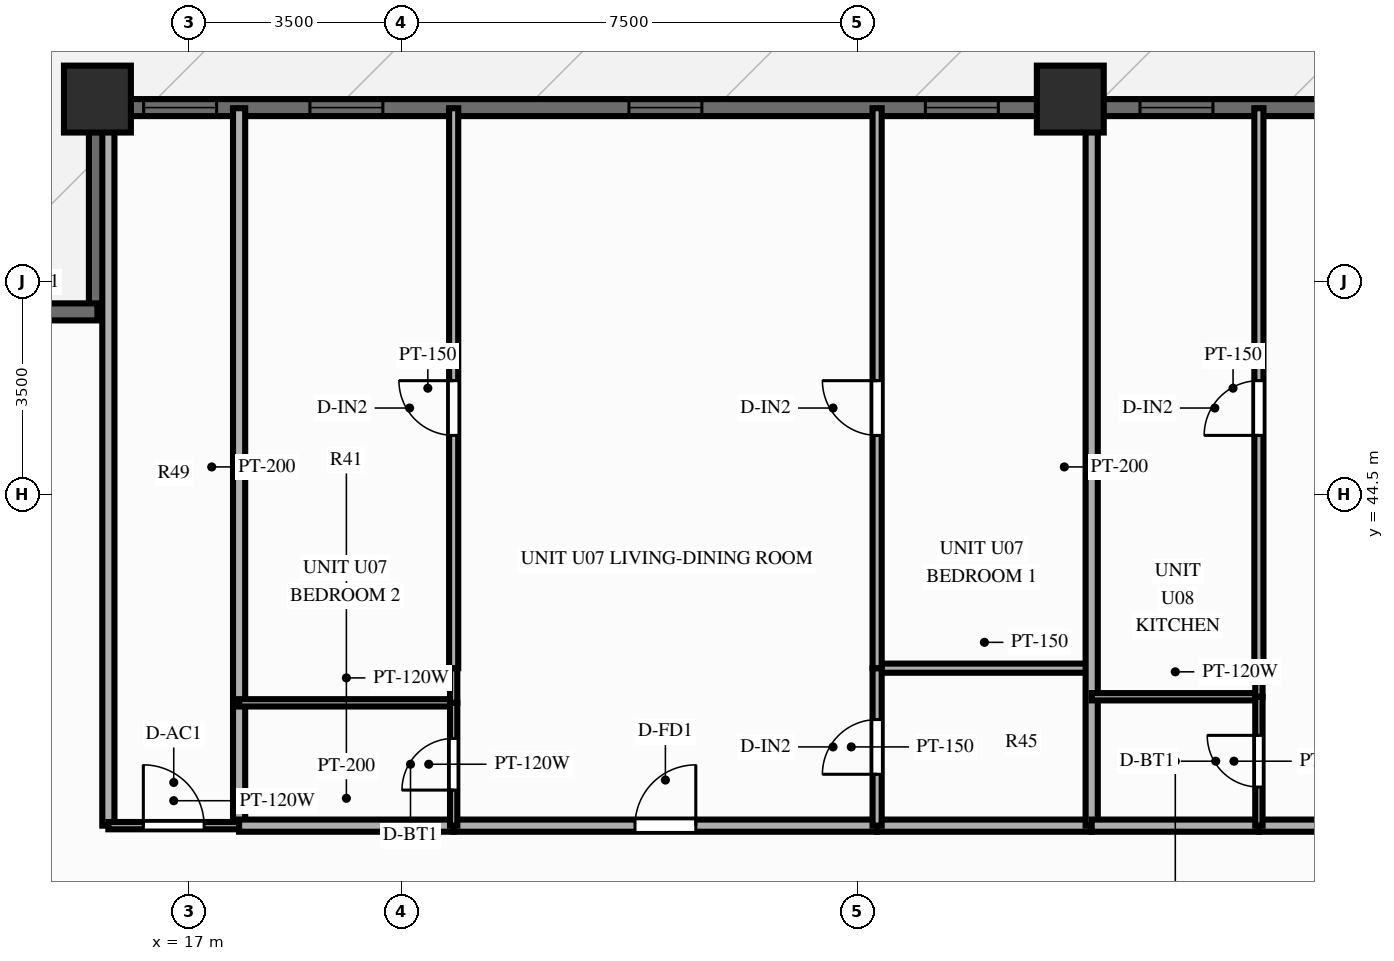
"""IFC4 building model, lengths in metres.
Left out: names, types, materials, properties, quantities, classifications, styles, units other than length and angle.
Written with IfcOpenShell. Run it as: python <this file> out.ifc"""

import sys

from ifc_helpers import new_model, si_unit, direction, frame, frame_2d, origin, origin_2d, place, context, subcontext, project, spatial, rectangle, extrude, source, transform, mapped, element, fill, save


model = new_model("IFC4")
c1 = context("Model", 3, precision=1e-05, world=origin(), true_north=direction((0.0, 1.0)))
c2 = subcontext(c1, "Body", "Model", "MODEL_VIEW")
j1 = project(units=[si_unit("LENGTHUNIT", "METRE"), si_unit("PLANEANGLEUNIT", "RADIAN")], contexts=[c1])
p1 = place(None, origin())
s1 = spatial("IfcSite", under=j1, at=p1, CompositionType="ELEMENT")
p2 = place(p1, origin())
s2 = spatial("IfcBuilding", under=s1, at=p2, CompositionType="ELEMENT")
p3 = place(p2, frame((0.0, 0.0, 19.4)))
s3 = spatial("IfcBuildingStorey", under=s2, at=p3, CompositionType="ELEMENT", Elevation=19.4)
m1 = source(origin(), c2, "Body", "SweptSolid", [
    extrude(rectangle(XDim=1.1, YDim=1.1, at=origin_2d()), origin(), (0.0, 0.0, 1.0), 3.0),
])
for number, where, z_axis, x_axis in (
    (1, (31.5, 51.0, 0.0), (0.0, 0.0, 1.0), (1.0, 0.0, 0.0)),
    (2, (15.5, 51.0, 0.0), (0.0, 0.0, 1.0), (1.0, 0.0, 0.0)),
):
    element("IfcColumn", number, at=place(p3, frame(where, z_axis=z_axis, x_axis=x_axis)), inside=s3, PredefinedType="COLUMN", context=c2, shape_type="MappedRepresentation", body=[
        mapped(m1, transform((0.0, 0.0, 0.0), scale=1.0)),
    ])
p4 = place(p3, frame((15.5, 50.86, 0.0), z_axis=(0.0, 0.0, 1.0), x_axis=(1.0, 0.0, 0.0)))
e3 = element("IfcWall", 3, at=p4, inside=s3, PredefinedType="SOLIDWALL", context=c2, shape_type="SweptSolid", body=[
    extrude(rectangle(XDim=45.0, YDim=0.28, at=frame_2d((22.5, 0.0))), origin(), (0.0, 0.0, 1.0), 2.28),
])
p5 = place(p4, frame((0.76, 0.0, 0.25)))
e4 = element("IfcOpeningElement", 4, at=p5, cuts=e3, PredefinedType="OPENING", context=c2, shape_type="SweptSolid", body=[
    extrude(rectangle(XDim=1.2, YDim=1.5, at=frame_2d((0.6, 0.75))), frame((0.0, 0.152, 0.0), z_axis=(0.0, -1.0, 0.0), x_axis=(1.0, 0.0, 0.0)), (0.0, 0.0, 1.0), 0.304),
])
p6 = place(p4, frame((3.494, 0.0, 0.25)))
e5 = element("IfcOpeningElement", 5, at=p6, cuts=e3, PredefinedType="OPENING", context=c2, shape_type="SweptSolid", body=[
    extrude(rectangle(XDim=1.2, YDim=1.5, at=frame_2d((0.6, 0.75))), frame((0.0, 0.152, 0.0), z_axis=(0.0, -1.0, 0.0), x_axis=(1.0, 0.0, 0.0)), (0.0, 0.0, 1.0), 0.304),
])
p7 = place(p4, frame((8.741, 0.0, 0.25)))
e6 = element("IfcOpeningElement", 6, at=p7, cuts=e3, PredefinedType="OPENING", context=c2, shape_type="SweptSolid", body=[
    extrude(rectangle(XDim=1.2, YDim=1.5, at=frame_2d((0.6, 0.75))), frame((0.0, 0.152, 0.0), z_axis=(0.0, -1.0, 0.0), x_axis=(1.0, 0.0, 0.0)), (0.0, 0.0, 1.0), 0.304),
])
p8 = place(p4, frame((13.616, 0.0, 0.25)))
e7 = element("IfcOpeningElement", 7, at=p8, cuts=e3, PredefinedType="OPENING", context=c2, shape_type="SweptSolid", body=[
    extrude(rectangle(XDim=1.2, YDim=1.5, at=frame_2d((0.6, 0.75))), frame((0.0, 0.152, 0.0), z_axis=(0.0, -1.0, 0.0), x_axis=(1.0, 0.0, 0.0)), (0.0, 0.0, 1.0), 0.304),
])
p9 = place(p4, frame((17.146, 0.0, 0.25)))
e8 = element("IfcOpeningElement", 8, at=p9, cuts=e3, PredefinedType="OPENING", context=c2, shape_type="SweptSolid", body=[
    extrude(rectangle(XDim=1.2, YDim=1.5, at=frame_2d((0.6, 0.75))), frame((0.0, 0.152, 0.0), z_axis=(0.0, -1.0, 0.0), x_axis=(1.0, 0.0, 0.0)), (0.0, 0.0, 1.0), 0.304),
])
p10 = place(p4, frame((22.423, 0.0, 0.0)))
e9 = element("IfcOpeningElement", 9, at=p10, cuts=e3, PredefinedType="OPENING", context=c2, shape_type="SweptSolid", body=[
    extrude(rectangle(XDim=1.1, YDim=2.15, at=frame_2d((0.55, 1.075))), frame((0.0, 0.152, 0.0), z_axis=(0.0, -1.0, 0.0), x_axis=(1.0, 0.0, 0.0)), (0.0, 0.0, 1.0), 0.304),
])
p11 = place(p4, frame((27.252, 0.0, 0.25)))
e10 = element("IfcOpeningElement", 10, at=p11, cuts=e3, PredefinedType="OPENING", context=c2, shape_type="SweptSolid", body=[
    extrude(rectangle(XDim=0.95, YDim=1.5, at=frame_2d((0.475, 0.75))), frame((0.0, 0.152, 0.0), z_axis=(0.0, -1.0, 0.0), x_axis=(1.0, 0.0, 0.0)), (0.0, 0.0, 1.0), 0.304),
])
p12 = place(p4, frame((30.873, 0.0, 0.25)))
e11 = element("IfcOpeningElement", 11, at=p12, cuts=e3, PredefinedType="OPENING", context=c2, shape_type="SweptSolid", body=[
    extrude(rectangle(XDim=1.2, YDim=1.5, at=frame_2d((0.6, 0.75))), frame((0.0, 0.152, 0.0), z_axis=(0.0, -1.0, 0.0), x_axis=(1.0, 0.0, 0.0)), (0.0, 0.0, 1.0), 0.304),
])
p13 = place(p4, frame((33.113, 0.0, 0.25)))
e12 = element("IfcOpeningElement", 12, at=p13, cuts=e3, PredefinedType="OPENING", context=c2, shape_type="SweptSolid", body=[
    extrude(rectangle(XDim=1.2, YDim=1.5, at=frame_2d((0.6, 0.75))), frame((0.0, 0.152, 0.0), z_axis=(0.0, -1.0, 0.0), x_axis=(1.0, 0.0, 0.0)), (0.0, 0.0, 1.0), 0.304),
])
p14 = place(p4, frame((35.624, 0.0, 0.25)))
e13 = element("IfcOpeningElement", 13, at=p14, cuts=e3, PredefinedType="OPENING", context=c2, shape_type="SweptSolid", body=[
    extrude(rectangle(XDim=1.2, YDim=1.5, at=frame_2d((0.6, 0.75))), frame((0.0, 0.152, 0.0), z_axis=(0.0, -1.0, 0.0), x_axis=(1.0, 0.0, 0.0)), (0.0, 0.0, 1.0), 0.304),
])
p15 = place(p4, frame((38.097, 0.0, 0.25)))
e14 = element("IfcOpeningElement", 14, at=p15, cuts=e3, PredefinedType="OPENING", context=c2, shape_type="SweptSolid", body=[
    extrude(rectangle(XDim=1.2, YDim=1.5, at=frame_2d((0.6, 0.75))), frame((0.0, 0.152, 0.0), z_axis=(0.0, -1.0, 0.0), x_axis=(1.0, 0.0, 0.0)), (0.0, 0.0, 1.0), 0.304),
])
p16 = place(p4, frame((40.336, 0.0, 0.25)))
e15 = element("IfcOpeningElement", 15, at=p16, cuts=e3, PredefinedType="OPENING", context=c2, shape_type="SweptSolid", body=[
    extrude(rectangle(XDim=1.2, YDim=1.5, at=frame_2d((0.6, 0.75))), frame((0.0, 0.152, 0.0), z_axis=(0.0, -1.0, 0.0), x_axis=(1.0, 0.0, 0.0)), (0.0, 0.0, 1.0), 0.304),
])
p17 = place(p4, frame((42.743, 0.0, 0.25)))
e16 = element("IfcOpeningElement", 16, at=p17, cuts=e3, PredefinedType="OPENING", context=c2, shape_type="SweptSolid", body=[
    extrude(rectangle(XDim=1.2, YDim=1.5, at=frame_2d((0.6, 0.75))), frame((0.0, 0.152, 0.0), z_axis=(0.0, -1.0, 0.0), x_axis=(1.0, 0.0, 0.0)), (0.0, 0.0, 1.0), 0.304),
])
for number, where, z_axis, x_axis in (
    (17, (15.5, 47.5, 0.0), (0.0, 0.0, 1.0), (0.0, 1.0, 0.0)),
    (18, (12.08, 47.5, 0.0), (0.0, 0.0, 1.0), (1.0, 0.0, 0.0)),
):
    element("IfcWall", number, at=place(p3, frame(where, z_axis=z_axis, x_axis=x_axis)), inside=s3, PredefinedType="SOLIDWALL", context=c2, shape_type="SweptSolid", body=[
        extrude(rectangle(XDim=3.42, YDim=0.28, at=frame_2d((1.71, 0.0))), origin(), (0.0, 0.0, 1.0), 2.28),
    ])
for number, where, z_axis, x_axis in (
    (19, (15.68, 39.05, 0.0), (0.0, 0.0, 1.0), (0.0, 1.0, 0.0)),
    (20, (17.83, 39.05, 0.0), (0.0, 0.0, 1.0), (0.0, 1.0, 0.0)),
):
    element("IfcWall", number, at=place(p3, frame(where, z_axis=z_axis, x_axis=x_axis)), inside=s3, PredefinedType="PARTITIONING", context=c2, shape_type="SweptSolid", body=[
        extrude(rectangle(XDim=11.8, YDim=0.2, at=frame_2d((5.9, 0.0))), origin(), (0.0, 0.0, 1.0), 2.79),
    ])
p18 = place(p3, frame((15.68, 39.05, 0.0), z_axis=(0.0, 0.0, 1.0), x_axis=(1.0, 0.0, 0.0)))
e21 = element("IfcWall", 21, at=p18, inside=s3, PredefinedType="PARTITIONING", context=c2, shape_type="SweptSolid", body=[
    extrude(rectangle(XDim=2.15, YDim=0.12, at=frame_2d((1.075, 0.0))), origin(), (0.0, 0.0, 1.0), 2.79),
])
p19 = place(p18, frame((0.575, 0.0, 0.0)))
e22 = element("IfcOpeningElement", 22, at=p19, cuts=e21, PredefinedType="OPENING", context=c2, shape_type="SweptSolid", body=[
    extrude(rectangle(XDim=1.0, YDim=2.1, at=frame_2d((0.5, 1.05))), frame((0.0, 0.072, 0.0), z_axis=(0.0, -1.0, 0.0), x_axis=(1.0, 0.0, 0.0)), (0.0, 0.0, 1.0), 0.144),
])
p20 = place(p3, frame((17.83, 39.05, 0.0), z_axis=(0.0, 0.0, 1.0), x_axis=(1.0, 0.0, 0.0)))
e23 = element("IfcWall", 23, at=p20, inside=s3, PredefinedType="PARTITIONING", context=c2, shape_type="SweptSolid", body=[
    extrude(rectangle(XDim=3.529, YDim=0.2, at=frame_2d((1.764, 0.0))), origin(), (0.0, 0.0, 1.0), 2.79),
])
p21 = place(p3, frame((21.359, 39.05, 0.0), z_axis=(0.0, 0.0, 1.0), x_axis=(1.0, 0.0, 0.0)))
e24 = element("IfcWall", 24, at=p21, inside=s3, PredefinedType="PARTITIONING", context=c2, shape_type="SweptSolid", body=[
    extrude(rectangle(XDim=6.964, YDim=0.2, at=frame_2d((3.482, 0.0))), origin(), (0.0, 0.0, 1.0), 2.79),
])
p22 = place(p21, frame((2.982, 0.0, 0.0)))
e25 = element("IfcOpeningElement", 25, at=p22, cuts=e24, PredefinedType="OPENING", context=c2, shape_type="SweptSolid", body=[
    extrude(rectangle(XDim=1.0, YDim=2.15, at=frame_2d((0.5, 1.075))), frame((0.0, 0.112, 0.0), z_axis=(0.0, -1.0, 0.0), x_axis=(1.0, 0.0, 0.0)), (0.0, 0.0, 1.0), 0.224),
])
p23 = place(p3, frame((28.323, 39.05, 0.0), z_axis=(0.0, 0.0, 1.0), x_axis=(1.0, 0.0, 0.0)))
e26 = element("IfcWall", 26, at=p23, inside=s3, PredefinedType="PARTITIONING", context=c2, shape_type="SweptSolid", body=[
    extrude(rectangle(XDim=3.529, YDim=0.2, at=frame_2d((1.764, 0.0))), origin(), (0.0, 0.0, 1.0), 2.79),
])
p24 = place(p3, frame((17.83, 41.07, 0.0), z_axis=(0.0, 0.0, 1.0), x_axis=(1.0, 0.0, 0.0)))
e27 = element("IfcWall", 27, at=p24, inside=s3, PredefinedType="PARTITIONING", context=c2, shape_type="SweptSolid", body=[
    extrude(rectangle(XDim=3.529, YDim=0.12, at=frame_2d((1.764, 0.0))), origin(), (0.0, 0.0, 1.0), 2.79),
])
p25 = place(p3, frame((28.323, 41.64, 0.0), z_axis=(0.0, 0.0, 1.0), x_axis=(1.0, 0.0, 0.0)))
e28 = element("IfcWall", 28, at=p25, inside=s3, PredefinedType="PARTITIONING", context=c2, shape_type="SweptSolid", body=[
    extrude(rectangle(XDim=3.529, YDim=0.15, at=frame_2d((1.764, 0.0))), origin(), (0.0, 0.0, 1.0), 2.79),
])
p26 = place(p3, frame((21.359, 39.05, 0.0), z_axis=(0.0, 0.0, 1.0), x_axis=(0.0, 1.0, 0.0)))
e29 = element("IfcWall", 29, at=p26, inside=s3, PredefinedType="PARTITIONING", context=c2, shape_type="SweptSolid", body=[
    extrude(rectangle(XDim=2.02, YDim=0.12, at=frame_2d((1.01, 0.0))), origin(), (0.0, 0.0, 1.0), 2.79),
])
p27 = place(p26, frame((0.585, 0.0, 0.0)))
e30 = element("IfcOpeningElement", 30, at=p27, cuts=e29, PredefinedType="OPENING", context=c2, shape_type="SweptSolid", body=[
    extrude(rectangle(XDim=0.85, YDim=2.05, at=frame_2d((0.425, 1.025))), frame((0.0, 0.072, 0.0), z_axis=(0.0, -1.0, 0.0), x_axis=(1.0, 0.0, 0.0)), (0.0, 0.0, 1.0), 0.144),
])
p28 = place(p3, frame((21.359, 41.07, 0.0), z_axis=(0.0, 0.0, 1.0), x_axis=(0.0, 1.0, 0.0)))
e31 = element("IfcWall", 31, at=p28, inside=s3, PredefinedType="PARTITIONING", context=c2, shape_type="SweptSolid", body=[
    extrude(rectangle(XDim=0.57, YDim=0.12, at=frame_2d((0.285, 0.0))), origin(), (0.0, 0.0, 1.0), 2.79),
])
p29 = place(p3, frame((21.359, 41.64, 0.0), z_axis=(0.0, 0.0, 1.0), x_axis=(0.0, 1.0, 0.0)))
e32 = element("IfcWall", 32, at=p29, inside=s3, PredefinedType="PARTITIONING", context=c2, shape_type="SweptSolid", body=[
    extrude(rectangle(XDim=9.21, YDim=0.15, at=frame_2d((4.605, 0.0))), origin(), (0.0, 0.0, 1.0), 2.79),
])
p30 = place(p29, frame((3.829, 0.0, 0.0)))
e33 = element("IfcOpeningElement", 33, at=p30, cuts=e32, PredefinedType="OPENING", context=c2, shape_type="SweptSolid", body=[
    extrude(rectangle(XDim=0.9, YDim=2.1, at=frame_2d((0.45, 1.05))), frame((0.0, 0.087, 0.0), z_axis=(0.0, -1.0, 0.0), x_axis=(1.0, 0.0, 0.0)), (0.0, 0.0, 1.0), 0.174),
])
p31 = place(p3, frame((28.323, 39.05, 0.0), z_axis=(0.0, 0.0, 1.0), x_axis=(0.0, 1.0, 0.0)))
e34 = element("IfcWall", 34, at=p31, inside=s3, PredefinedType="PARTITIONING", context=c2, shape_type="SweptSolid", body=[
    extrude(rectangle(XDim=2.59, YDim=0.15, at=frame_2d((1.295, 0.0))), origin(), (0.0, 0.0, 1.0), 2.79),
])
p32 = place(p31, frame((0.845, 0.0, 0.0)))
e35 = element("IfcOpeningElement", 35, at=p32, cuts=e34, PredefinedType="OPENING", context=c2, shape_type="SweptSolid", body=[
    extrude(rectangle(XDim=0.9, YDim=2.1, at=frame_2d((0.45, 1.05))), frame((0.0, 0.087, 0.0), z_axis=(0.0, -1.0, 0.0), x_axis=(1.0, 0.0, 0.0)), (0.0, 0.0, 1.0), 0.174),
])
p33 = place(p3, frame((28.323, 41.64, 0.0), z_axis=(0.0, 0.0, 1.0), x_axis=(0.0, 1.0, 0.0)))
e36 = element("IfcWall", 36, at=p33, inside=s3, PredefinedType="PARTITIONING", context=c2, shape_type="SweptSolid", body=[
    extrude(rectangle(XDim=9.21, YDim=0.15, at=frame_2d((4.605, 0.0))), origin(), (0.0, 0.0, 1.0), 2.79),
])
p34 = place(p33, frame((3.829, 0.0, 0.0)))
e37 = element("IfcOpeningElement", 37, at=p34, cuts=e36, PredefinedType="OPENING", context=c2, shape_type="SweptSolid", body=[
    extrude(rectangle(XDim=0.9, YDim=2.1, at=frame_2d((0.45, 1.05))), frame((0.0, 0.087, 0.0), z_axis=(0.0, -1.0, 0.0), x_axis=(1.0, 0.0, 0.0)), (0.0, 0.0, 1.0), 0.174),
])
p35 = place(p3, frame((31.852, 39.05, 0.0), z_axis=(0.0, 0.0, 1.0), x_axis=(0.0, 1.0, 0.0)))
e38 = element("IfcWall", 38, at=p35, inside=s3, PredefinedType="PARTITIONING", context=c2, shape_type="SweptSolid", body=[
    extrude(rectangle(XDim=11.8, YDim=0.2, at=frame_2d((5.9, 0.0))), origin(), (0.0, 0.0, 1.0), 2.79),
])
p36 = place(p3, frame((31.852, 39.05, 0.0), z_axis=(0.0, 0.0, 1.0), x_axis=(1.0, 0.0, 0.0)))
e39 = element("IfcWall", 39, at=p36, inside=s3, PredefinedType="PARTITIONING", context=c2, shape_type="SweptSolid", body=[
    extrude(rectangle(XDim=2.75, YDim=0.2, at=frame_2d((1.375, 0.0))), origin(), (0.0, 0.0, 1.0), 2.79),
])
p37 = place(p3, frame((34.602, 39.05, 0.0), z_axis=(0.0, 0.0, 1.0), x_axis=(1.0, 0.0, 0.0)))
e40 = element("IfcWall", 40, at=p37, inside=s3, PredefinedType="PARTITIONING", context=c2, shape_type="SweptSolid", body=[
    extrude(rectangle(XDim=7.743, YDim=0.2, at=frame_2d((3.871, 0.0))), origin(), (0.0, 0.0, 1.0), 2.79),
])
p38 = place(p37, frame((3.371, 0.0, 0.0)))
e41 = element("IfcOpeningElement", 41, at=p38, cuts=e40, PredefinedType="OPENING", context=c2, shape_type="SweptSolid", body=[
    extrude(rectangle(XDim=1.0, YDim=2.15, at=frame_2d((0.5, 1.075))), frame((0.0, 0.112, 0.0), z_axis=(0.0, -1.0, 0.0), x_axis=(1.0, 0.0, 0.0)), (0.0, 0.0, 1.0), 0.224),
])
p39 = place(p3, frame((31.852, 41.17, 0.0), z_axis=(0.0, 0.0, 1.0), x_axis=(1.0, 0.0, 0.0)))
e42 = element("IfcWall", 42, at=p39, inside=s3, PredefinedType="PARTITIONING", context=c2, shape_type="SweptSolid", body=[
    extrude(rectangle(XDim=2.75, YDim=0.12, at=frame_2d((1.375, 0.0))), origin(), (0.0, 0.0, 1.0), 2.79),
])
p40 = place(p3, frame((34.602, 39.05, 0.0), z_axis=(0.0, 0.0, 1.0), x_axis=(0.0, 1.0, 0.0)))
e43 = element("IfcWall", 43, at=p40, inside=s3, PredefinedType="PARTITIONING", context=c2, shape_type="SweptSolid", body=[
    extrude(rectangle(XDim=2.12, YDim=0.12, at=frame_2d((1.06, 0.0))), origin(), (0.0, 0.0, 1.0), 2.79),
])
p41 = place(p40, frame((0.635, 0.0, 0.0)))
e44 = element("IfcOpeningElement", 44, at=p41, cuts=e43, PredefinedType="OPENING", context=c2, shape_type="SweptSolid", body=[
    extrude(rectangle(XDim=0.85, YDim=2.05, at=frame_2d((0.425, 1.025))), frame((0.0, 0.072, 0.0), z_axis=(0.0, -1.0, 0.0), x_axis=(1.0, 0.0, 0.0)), (0.0, 0.0, 1.0), 0.144),
])
p42 = place(p3, frame((34.602, 41.17, 0.0), z_axis=(0.0, 0.0, 1.0), x_axis=(0.0, 1.0, 0.0)))
e45 = element("IfcWall", 45, at=p42, inside=s3, PredefinedType="PARTITIONING", context=c2, shape_type="SweptSolid", body=[
    extrude(rectangle(XDim=0.47, YDim=0.12, at=frame_2d((0.235, 0.0))), origin(), (0.0, 0.0, 1.0), 2.79),
])
p43 = place(p3, frame((34.602, 41.64, 0.0), z_axis=(0.0, 0.0, 1.0), x_axis=(0.0, 1.0, 0.0)))
e46 = element("IfcWall", 46, at=p43, inside=s3, PredefinedType="PARTITIONING", context=c2, shape_type="SweptSolid", body=[
    extrude(rectangle(XDim=9.21, YDim=0.15, at=frame_2d((4.605, 0.0))), origin(), (0.0, 0.0, 1.0), 2.79),
])
p44 = place(p43, frame((3.829, 0.0, 0.0)))
e47 = element("IfcOpeningElement", 47, at=p44, cuts=e46, PredefinedType="OPENING", context=c2, shape_type="SweptSolid", body=[
    extrude(rectangle(XDim=0.9, YDim=2.1, at=frame_2d((0.45, 1.05))), frame((0.0, 0.087, 0.0), z_axis=(0.0, -1.0, 0.0), x_axis=(1.0, 0.0, 0.0)), (0.0, 0.0, 1.0), 0.174),
])
m2 = source(origin(), c2, "Body", "SweptSolid", [
    extrude(rectangle(XDim=1.2, YDim=1.5, at=frame_2d((0.6, 0.75))), frame((0.0, 0.03, 0.0), z_axis=(0.0, -1.0, 0.0), x_axis=(1.0, 0.0, 0.0)), (0.0, 0.0, 1.0), 0.06),
])
p45 = place(p5, origin())
e48 = element("IfcWindow", 48, at=p45, inside=s3, PartitioningType="SINGLE_PANEL", PredefinedType="WINDOW", context=c2, shape_type="MappedRepresentation", body=[
    mapped(m2, transform((0.0, 0.0, 0.0), scale=1.0)),
])
fill(e4, e48)
p46 = place(p6, origin())
e49 = element("IfcWindow", 49, at=p46, inside=s3, PartitioningType="SINGLE_PANEL", PredefinedType="WINDOW", context=c2, shape_type="MappedRepresentation", body=[
    mapped(m2, transform((0.0, 0.0, 0.0), scale=1.0)),
])
fill(e5, e49)
p47 = place(p7, origin())
e50 = element("IfcWindow", 50, at=p47, inside=s3, PartitioningType="SINGLE_PANEL", PredefinedType="WINDOW", context=c2, shape_type="MappedRepresentation", body=[
    mapped(m2, transform((0.0, 0.0, 0.0), scale=1.0)),
])
fill(e6, e50)
p48 = place(p8, origin())
e51 = element("IfcWindow", 51, at=p48, inside=s3, PartitioningType="SINGLE_PANEL", PredefinedType="WINDOW", context=c2, shape_type="MappedRepresentation", body=[
    mapped(m2, transform((0.0, 0.0, 0.0), scale=1.0)),
])
fill(e7, e51)
p49 = place(p9, origin())
e52 = element("IfcWindow", 52, at=p49, inside=s3, PartitioningType="SINGLE_PANEL", PredefinedType="WINDOW", context=c2, shape_type="MappedRepresentation", body=[
    mapped(m2, transform((0.0, 0.0, 0.0), scale=1.0)),
])
fill(e8, e52)
m3 = source(origin(), c2, "Body", "SweptSolid", [
    extrude(rectangle(XDim=1.0, YDim=2.1, at=frame_2d((0.5, 1.05))), frame((0.0, 0.025, 0.0), z_axis=(0.0, -1.0, 0.0), x_axis=(1.0, 0.0, 0.0)), (0.0, 0.0, 1.0), 0.05),
])
p50 = place(p19, origin())
e53 = element("IfcDoor", 53, at=p50, inside=s3, OperationType="SINGLE_SWING_LEFT", PredefinedType="DOOR", context=c2, shape_type="MappedRepresentation", body=[
    mapped(m3, transform((0.0, 0.0, 0.0), scale=1.0)),
])
fill(e22, e53)
m4 = source(origin(), c2, "Body", "SweptSolid", [
    extrude(rectangle(XDim=1.0, YDim=2.15, at=frame_2d((0.5, 1.075))), frame((0.0, 0.025, 0.0), z_axis=(0.0, -1.0, 0.0), x_axis=(1.0, 0.0, 0.0)), (0.0, 0.0, 1.0), 0.05),
])
p51 = place(p22, origin())
e54 = element("IfcDoor", 54, at=p51, inside=s3, OperationType="SINGLE_SWING_RIGHT", PredefinedType="DOOR", context=c2, shape_type="MappedRepresentation", body=[
    mapped(m4, transform((0.0, 0.0, 0.0), scale=1.0)),
])
fill(e25, e54)
m5 = source(origin(), c2, "Body", "SweptSolid", [
    extrude(rectangle(XDim=0.85, YDim=2.05, at=frame_2d((0.425, 1.025))), frame((0.0, 0.025, 0.0), z_axis=(0.0, -1.0, 0.0), x_axis=(1.0, 0.0, 0.0)), (0.0, 0.0, 1.0), 0.05),
])
p52 = place(p27, origin())
e55 = element("IfcDoor", 55, at=p52, inside=s3, OperationType="SINGLE_SWING_LEFT", PredefinedType="DOOR", context=c2, shape_type="MappedRepresentation", body=[
    mapped(m5, transform((0.0, 0.0, 0.0), scale=1.0)),
])
fill(e30, e55)
m6 = source(origin(), c2, "Body", "SweptSolid", [
    extrude(rectangle(XDim=0.9, YDim=2.1, at=frame_2d((0.45, 1.05))), frame((0.0, 0.025, 0.0), z_axis=(0.0, -1.0, 0.0), x_axis=(1.0, 0.0, 0.0)), (0.0, 0.0, 1.0), 0.05),
])
p53 = place(p30, origin())
e56 = element("IfcDoor", 56, at=p53, inside=s3, OperationType="SINGLE_SWING_RIGHT", PredefinedType="DOOR", context=c2, shape_type="MappedRepresentation", body=[
    mapped(m6, transform((0.0, 0.0, 0.0), scale=1.0)),
])
fill(e33, e56)
p54 = place(p32, origin())
e57 = element("IfcDoor", 57, at=p54, inside=s3, OperationType="SINGLE_SWING_LEFT", PredefinedType="DOOR", context=c2, shape_type="MappedRepresentation", body=[
    mapped(m6, transform((0.0, 0.0, 0.0), scale=1.0)),
])
fill(e35, e57)
p55 = place(p34, origin())
e58 = element("IfcDoor", 58, at=p55, inside=s3, OperationType="SINGLE_SWING_RIGHT", PredefinedType="DOOR", context=c2, shape_type="MappedRepresentation", body=[
    mapped(m6, transform((0.0, 0.0, 0.0), scale=1.0)),
])
fill(e37, e58)
p56 = place(p41, origin())
e59 = element("IfcDoor", 59, at=p56, inside=s3, OperationType="SINGLE_SWING_RIGHT", PredefinedType="DOOR", context=c2, shape_type="MappedRepresentation", body=[
    mapped(m5, transform((0.0, 0.0, 0.0), scale=1.0)),
])
fill(e44, e59)
p57 = place(p44, origin())
e60 = element("IfcDoor", 60, at=p57, inside=s3, OperationType="SINGLE_SWING_LEFT", PredefinedType="DOOR", context=c2, shape_type="MappedRepresentation", body=[
    mapped(m6, transform((0.0, 0.0, 0.0), scale=1.0)),
])
fill(e47, e60)
save(model, sys.argv[1])
